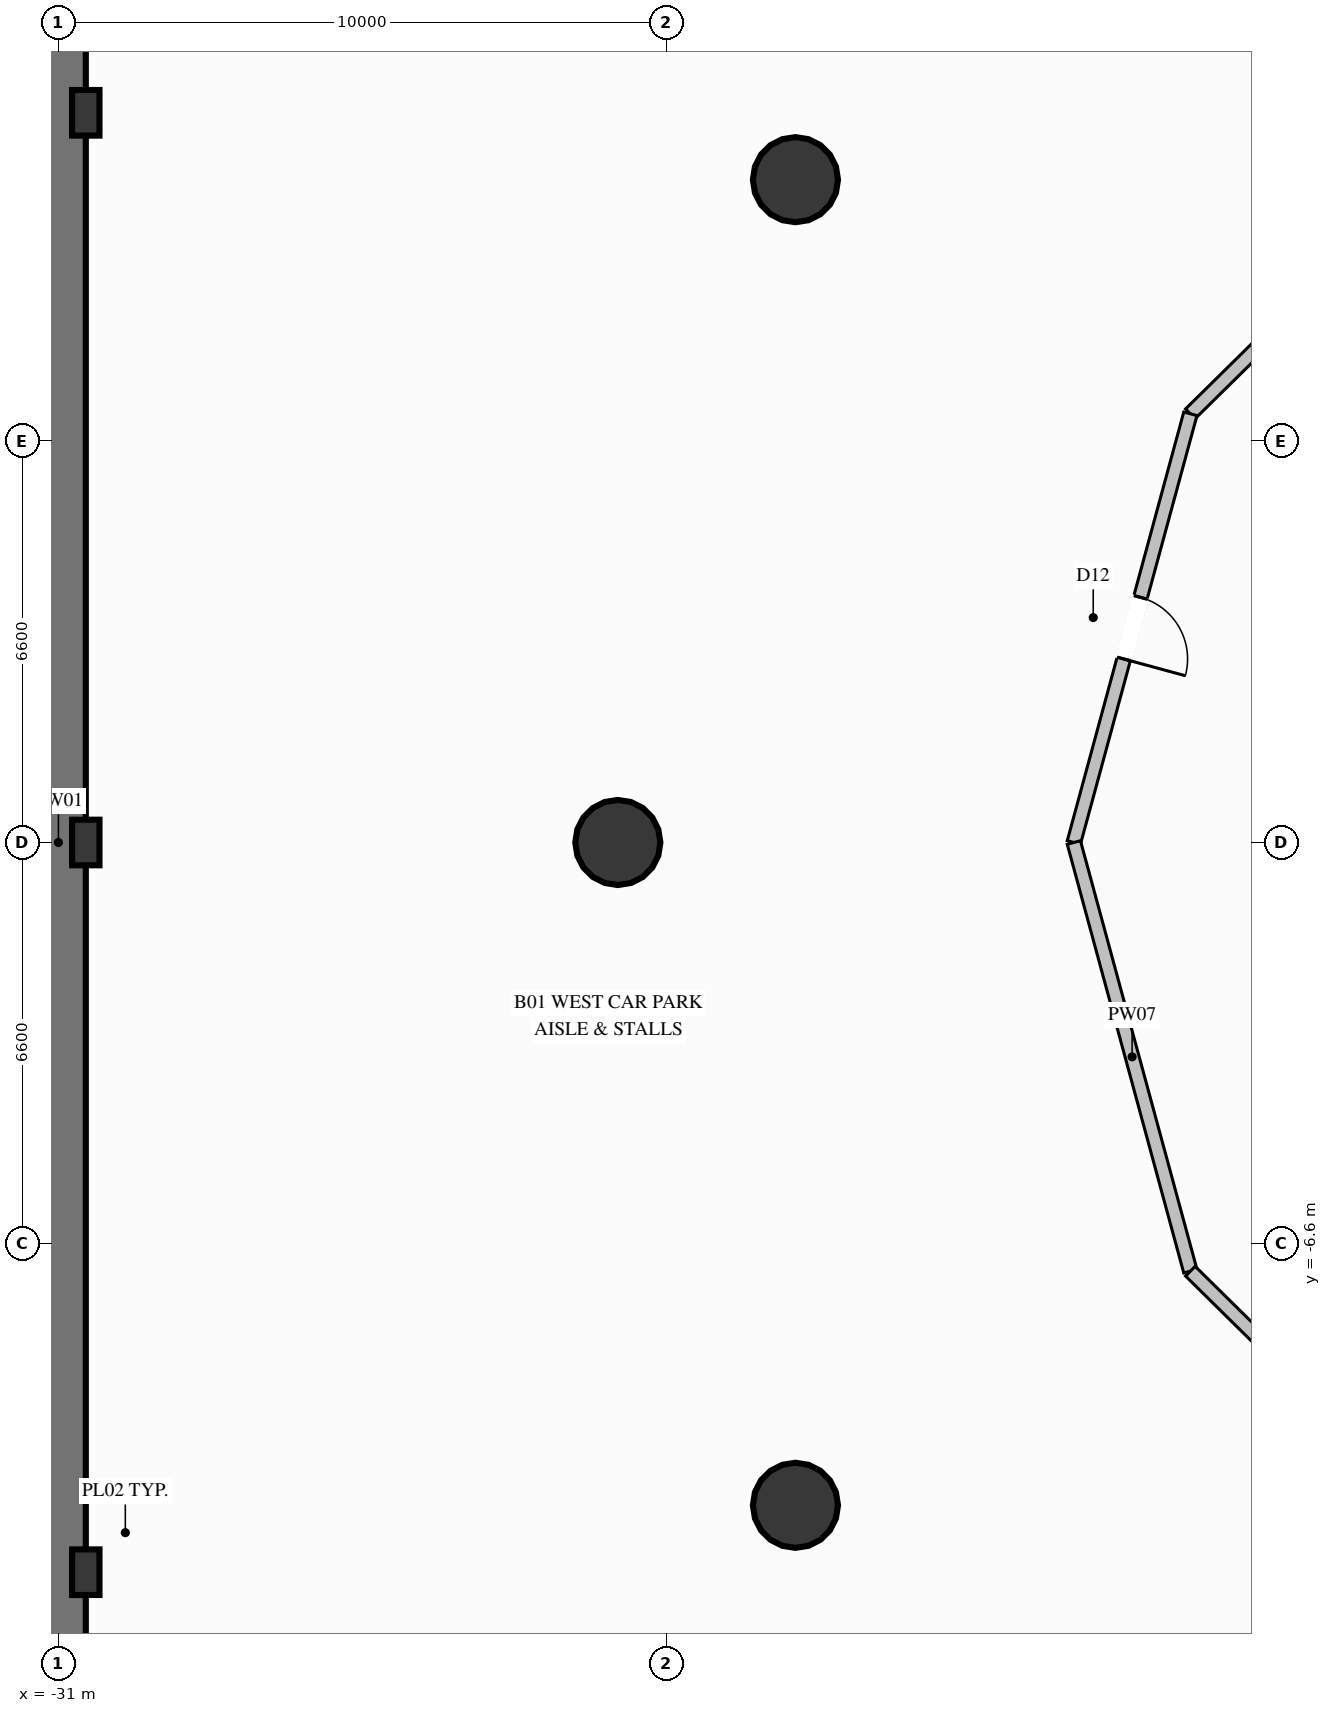
"""IFC4 building model, lengths in metres.
Left out: names, types, materials, properties, quantities, classifications, styles, units other than length and angle.
Written with IfcOpenShell. Run it as: python <this file> out.ifc"""

import sys

from ifc_helpers import new_model, si_unit, direction, frame, frame_2d, origin, origin_2d, place, context, subcontext, project, spatial, rectangle, circle, extrude, element, fill, save


model = new_model("IFC4")
c1 = context("Model", 3, precision=1e-05, world=origin(), true_north=direction((0.0, 1.0)))
c2 = subcontext(c1, "Body", "Model", "MODEL_VIEW")
j1 = project(units=[si_unit("LENGTHUNIT", "METRE"), si_unit("PLANEANGLEUNIT", "RADIAN")], contexts=[c1])
p1 = place(None, origin())
s1 = spatial("IfcSite", under=j1, at=p1, CompositionType="ELEMENT")
p2 = place(p1, origin())
s2 = spatial("IfcBuilding", under=s1, at=p2, CompositionType="ELEMENT")
p3 = place(p2, frame((0.0, 0.0, -4.8)))
s3 = spatial("IfcBuildingStorey", under=s2, at=p3, CompositionType="ELEMENT", Elevation=-4.8)
p4 = place(p3, frame((-31.0, 22.55, 0.0), z_axis=(0.0, 0.0, 1.0), x_axis=(0.0, -1.0, 0.0)))
e1 = element("IfcWall", 1, at=p4, inside=s3, PredefinedType="SHEAR", context=c2, shape_type="SweptSolid", body=[
    extrude(rectangle(XDim=45.1, YDim=0.9, at=frame_2d((22.55, 0.0))), origin(), (0.0, 0.0, 1.0), 4.8),
])
for number, where, z_axis, x_axis in (
    (2, (-30.55, -12.0, 0.0), (0.0, 0.0, 1.0), (1.0, 0.0, 0.0)),
    (3, (-30.55, 0.0, 0.0), (0.0, 0.0, 1.0), (1.0, 0.0, 0.0)),
    (4, (-30.55, 12.0, 0.0), (0.0, 0.0, 1.0), (1.0, 0.0, 0.0)),
):
    element("IfcColumn", number, at=place(p3, frame(where, z_axis=z_axis, x_axis=x_axis)), inside=s3, PredefinedType="PILASTER", context=c2, shape_type="SweptSolid", body=[
        extrude(rectangle(XDim=0.45, YDim=0.75, at=origin_2d()), origin(), (0.0, 0.0, 1.0), 4.8),
    ])
for number, where, z_axis, x_axis in (
    (5, (-18.879, 10.9, 0.0), (0.0, 0.0, 1.0), (1.0, 0.0, 0.0)),
    (6, (-21.8, 0.0, 0.0), (0.0, 0.0, 1.0), (1.0, 0.0, 0.0)),
    (7, (-18.879, -10.9, 0.0), (0.0, 0.0, 1.0), (1.0, 0.0, 0.0)),
):
    element("IfcColumn", number, at=place(p3, frame(where, z_axis=z_axis, x_axis=x_axis)), inside=s3, PredefinedType="COLUMN", context=c2, shape_type="SweptSolid", body=[
        extrude(circle(Radius=0.7, at=origin_2d()), origin(), (0.0, 0.0, 1.0), 4.8),
    ])
p5 = place(p3, frame((-7.15, 12.211, 0.0), z_axis=(0.0, 0.0, 1.0), x_axis=(-0.712071304345, -0.702107155303, 0.0)))
e8 = element("IfcWall", 8, at=p5, inside=s3, PredefinedType="PARTITIONING", context=c2, shape_type="SweptSolid", body=[
    extrude(rectangle(XDim=7.351, YDim=0.225, at=frame_2d((3.675, 0.0))), origin(), (0.0, 0.0, 1.0), 4.395),
])
p6 = place(p3, frame((-12.384, 7.05, 0.0), z_axis=(0.0, 0.0, 1.0), x_axis=(-0.262260528785, -0.964997106235, 0.0)))
e9 = element("IfcWall", 9, at=p6, inside=s3, PredefinedType="PARTITIONING", context=c2, shape_type="SweptSolid", body=[
    extrude(rectangle(XDim=7.306, YDim=0.225, at=frame_2d((3.653, 0.0))), origin(), (0.0, 0.0, 1.0), 4.395),
])
p7 = place(p6, frame((3.128, 0.0, 0.0)))
e10 = element("IfcOpeningElement", 10, at=p7, cuts=e9, PredefinedType="OPENING", context=c2, shape_type="SweptSolid", body=[
    extrude(rectangle(XDim=1.05, YDim=2.15, at=frame_2d((0.525, 1.075))), frame((0.0, 0.123, 0.0), z_axis=(0.0, -1.0, 0.0), x_axis=(1.0, 0.0, 0.0)), (0.0, 0.0, 1.0), 0.245),
])
p8 = place(p3, frame((-14.3, 0.0, 0.0), z_axis=(0.0, 0.0, 1.0), x_axis=(0.262260528785, -0.964997106235, 0.0)))
e11 = element("IfcWall", 11, at=p8, inside=s3, PredefinedType="PARTITIONING", context=c2, shape_type="SweptSolid", body=[
    extrude(rectangle(XDim=7.306, YDim=0.225, at=frame_2d((3.653, 0.0))), origin(), (0.0, 0.0, 1.0), 4.395),
])
p9 = place(p3, frame((-12.384, -7.05, 0.0), z_axis=(0.0, 0.0, 1.0), x_axis=(0.712071304345, -0.702107155303, 0.0)))
e12 = element("IfcWall", 12, at=p9, inside=s3, PredefinedType="PARTITIONING", context=c2, shape_type="SweptSolid", body=[
    extrude(rectangle(XDim=7.351, YDim=0.225, at=frame_2d((3.675, 0.0))), origin(), (0.0, 0.0, 1.0), 4.395),
])
p10 = place(p7, origin())
e13 = element("IfcDoor", 13, at=p10, inside=s3, OperationType="SINGLE_SWING_RIGHT", PredefinedType="DOOR", context=c2, shape_type="SweptSolid", body=[
    extrude(rectangle(XDim=1.05, YDim=2.15, at=frame_2d((0.525, 1.075))), frame((0.0, 0.025, 0.0), z_axis=(0.0, -1.0, 0.0), x_axis=(1.0, 0.0, 0.0)), (0.0, 0.0, 1.0), 0.05),
])
fill(e10, e13)
save(model, sys.argv[1])
